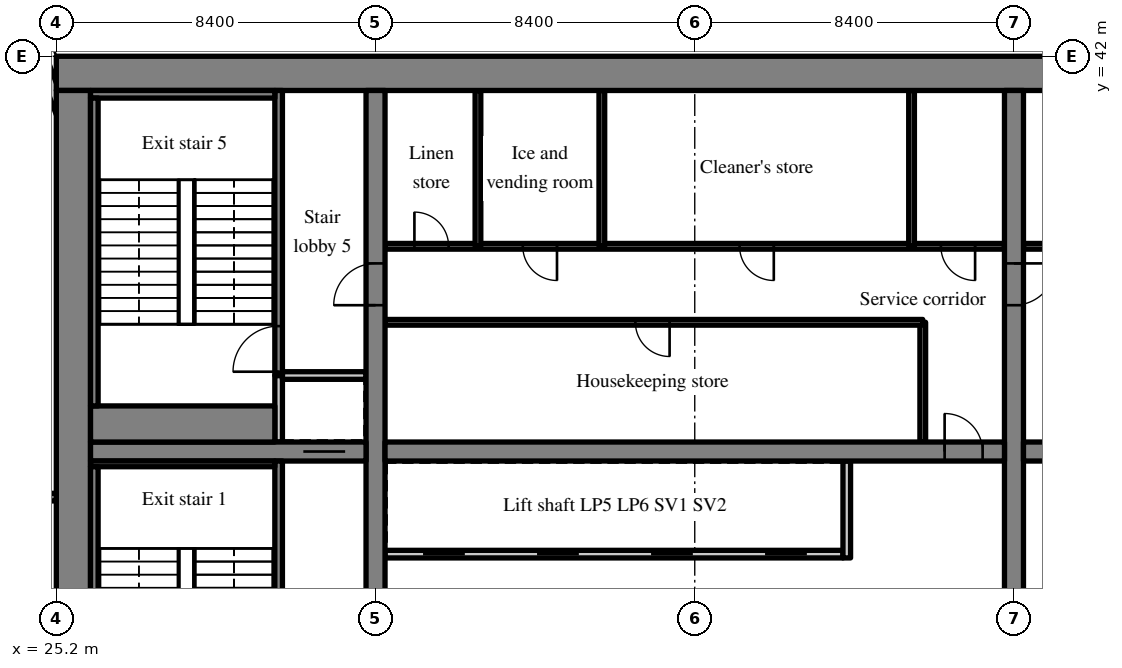
"""IFC4 building model, lengths in metres.
Left out: names, types, materials, properties, quantities, classifications, styles, units other than length and angle.
Written with IfcOpenShell. Run it as: python <this file> out.ifc"""

import sys

from ifc_helpers import new_model, si_unit, direction, frame, frame_2d, origin, place, context, subcontext, project, spatial, rectangle, extrude, source, transform, mapped, element, fill, save


model = new_model("IFC4")
c1 = context("Model", 3, precision=1e-05, world=origin(), true_north=direction((0.0, 1.0)))
c2 = subcontext(c1, "Body", "Model", "MODEL_VIEW")
j1 = project(units=[si_unit("LENGTHUNIT", "METRE"), si_unit("PLANEANGLEUNIT", "RADIAN")], contexts=[c1])
p1 = place(None, origin())
s1 = spatial("IfcSite", under=j1, at=p1, CompositionType="ELEMENT")
p2 = place(p1, origin())
s2 = spatial("IfcBuilding", under=s1, at=p2, CompositionType="ELEMENT")
p3 = place(p2, frame((0.0, 0.0, 121.8)))
s3 = spatial("IfcBuildingStorey", under=s2, at=p3, CompositionType="ELEMENT", Elevation=121.8)
m1 = source(origin(), c2, "Body", "SweptSolid", [
    extrude(rectangle(XDim=50.4, YDim=0.9, at=frame_2d((25.2, 0.0))), origin(), (0.0, 0.0, 1.0), 3.52),
])
p4 = place(p3, frame((25.2, 41.55, 0.0), z_axis=(0.0, 0.0, 1.0), x_axis=(1.0, 0.0, 0.0)))
e1 = element("IfcWall", 1, at=p4, inside=s3, PredefinedType="SHEAR", context=c2, shape_type="MappedRepresentation", body=[
    mapped(m1, transform((0.0, 0.0, 0.0), scale=1.0)),
])
m2 = source(origin(), c2, "Body", "SweptSolid", [
    extrude(rectangle(XDim=18.2, YDim=0.9, at=frame_2d((9.1, 0.0))), origin(), (0.0, 0.0, 1.0), 3.52),
])
p5 = place(p3, frame((25.65, 22.9, 0.0), z_axis=(0.0, 0.0, 1.0), x_axis=(0.0, 1.0, 0.0)))
e2 = element("IfcWall", 2, at=p5, inside=s3, PredefinedType="SHEAR", context=c2, shape_type="MappedRepresentation", body=[
    mapped(m2, transform((0.0, 0.0, 0.0), scale=1.0)),
])
m3 = source(origin(), c2, "Body", "SweptSolid", [
    extrude(rectangle(XDim=18.2, YDim=0.5, at=frame_2d((9.1, 0.0))), origin(), (0.0, 0.0, 1.0), 3.52),
])
p6 = place(p3, frame((33.6, 22.9, 0.0), z_axis=(0.0, 0.0, 1.0), x_axis=(0.0, 1.0, 0.0)))
e3 = element("IfcWall", 3, at=p6, inside=s3, PredefinedType="SHEAR", context=c2, shape_type="MappedRepresentation", body=[
    mapped(m3, transform((0.0, 0.0, 0.0), scale=1.0)),
])
m4 = source(origin(), c2, "Body", "SweptSolid", [
    extrude(rectangle(XDim=1.1, YDim=2.1, at=frame_2d((0.55, 1.05))), frame((0.0, 0.26, 0.0), z_axis=(0.0, -1.0, 0.0), x_axis=(1.0, 0.0, 0.0)), (0.0, 0.0, 1.0), 0.52),
])
p7 = place(p6, frame((12.55, 0.0, 0.0)))
e4 = element("IfcOpeningElement", 4, at=p7, cuts=e3, PredefinedType="OPENING", context=c2, shape_type="MappedRepresentation", body=[
    mapped(m4, transform((0.0, 0.0, 0.0), scale=1.0)),
])
p8 = place(p3, frame((50.4, 22.9, 0.0), z_axis=(0.0, 0.0, 1.0), x_axis=(0.0, 1.0, 0.0)))
e5 = element("IfcWall", 5, at=p8, inside=s3, PredefinedType="SHEAR", context=c2, shape_type="MappedRepresentation", body=[
    mapped(m3, transform((0.0, 0.0, 0.0), scale=1.0)),
])
p9 = place(p8, frame((12.55, 0.0, 0.0)))
e6 = element("IfcOpeningElement", 6, at=p9, cuts=e5, PredefinedType="OPENING", context=c2, shape_type="MappedRepresentation", body=[
    mapped(m4, transform((0.0, 0.0, 0.0), scale=1.0)),
])
m5 = source(origin(), c2, "Body", "SweptSolid", [
    extrude(rectangle(XDim=7.25, YDim=0.5, at=frame_2d((3.625, 0.0))), origin(), (0.0, 0.0, 1.0), 3.52),
])
p10 = place(p3, frame((26.1, 31.6, 0.0), z_axis=(0.0, 0.0, 1.0), x_axis=(1.0, 0.0, 0.0)))
e7 = element("IfcWall", 7, at=p10, inside=s3, PredefinedType="SHEAR", context=c2, shape_type="MappedRepresentation", body=[
    mapped(m5, transform((0.0, 0.0, 0.0), scale=1.0)),
])
p11 = place(p10, frame((5.6, 0.0, 0.0)))
e8 = element("IfcOpeningElement", 8, at=p11, cuts=e7, PredefinedType="OPENING", context=c2, shape_type="MappedRepresentation", body=[
    mapped(m4, transform((0.0, 0.0, 0.0), scale=1.0)),
])
m6 = source(origin(), c2, "Body", "SweptSolid", [
    extrude(rectangle(XDim=16.3, YDim=0.5, at=frame_2d((8.15, 0.0))), origin(), (0.0, 0.0, 1.0), 3.52),
])
p12 = place(p3, frame((33.85, 31.6, 0.0), z_axis=(0.0, 0.0, 1.0), x_axis=(1.0, 0.0, 0.0)))
e9 = element("IfcWall", 9, at=p12, inside=s3, PredefinedType="SHEAR", context=c2, shape_type="MappedRepresentation", body=[
    mapped(m6, transform((0.0, 0.0, 0.0), scale=1.0)),
])
m7 = source(origin(), c2, "Body", "SweptSolid", [
    extrude(rectangle(XDim=1.0, YDim=2.1, at=frame_2d((0.5, 1.05))), frame((0.0, 0.26, 0.0), z_axis=(0.0, -1.0, 0.0), x_axis=(1.0, 0.0, 0.0)), (0.0, 0.0, 1.0), 0.52),
])
p13 = place(p12, frame((14.725, 0.0, 0.0)))
e10 = element("IfcOpeningElement", 10, at=p13, cuts=e9, PredefinedType="OPENING", context=c2, shape_type="MappedRepresentation", body=[
    mapped(m7, transform((0.0, 0.0, 0.0), scale=1.0)),
])
m8 = source(origin(), c2, "Body", "SweptSolid", [
    extrude(rectangle(XDim=16.3, YDim=0.5, at=frame_2d((8.15, 0.0))), origin(), (0.0, 0.0, 1.0), 3.52),
])
p14 = place(p3, frame((50.65, 31.6, 0.0), z_axis=(0.0, 0.0, 1.0), x_axis=(1.0, 0.0, 0.0)))
e11 = element("IfcWall", 11, at=p14, inside=s3, PredefinedType="SHEAR", context=c2, shape_type="MappedRepresentation", body=[
    mapped(m8, transform((0.0, 0.0, 0.0), scale=1.0)),
])
p15 = place(p14, frame((0.575, 0.0, 0.0)))
e12 = element("IfcOpeningElement", 12, at=p15, cuts=e11, PredefinedType="OPENING", context=c2, shape_type="MappedRepresentation", body=[
    mapped(m7, transform((0.0, 0.0, 0.0), scale=1.0)),
])
m9 = source(origin(), c2, "Body", "SweptSolid", [
    extrude(rectangle(XDim=3.559, YDim=0.3, at=frame_2d((1.78, 0.0))), origin(), (0.0, 0.0, 1.0), 3.52),
])
p16 = place(p3, frame((25.55, 39.969, 0.0), z_axis=(0.0, 0.0, 1.0), x_axis=(-0.35779745313, 0.933799219604, 0.0)))
e13 = element("IfcWall", 13, at=p16, inside=s3, PredefinedType="SOLIDWALL", context=c2, shape_type="MappedRepresentation", body=[
    mapped(m9, transform((0.0, 0.0, 0.0), scale=1.0)),
])
m10 = source(origin(), c2, "Body", "SweptSolid", [
    extrude(rectangle(XDim=1.5, YDim=2.0, at=frame_2d((0.75, 1.0))), frame((0.0, 0.16, 0.0), z_axis=(0.0, -1.0, 0.0), x_axis=(1.0, 0.0, 0.0)), (0.0, 0.0, 1.0), 0.32),
])
p17 = place(p16, frame((1.903, 0.0, 0.9)))
e14 = element("IfcOpeningElement", 14, at=p17, cuts=e13, PredefinedType="OPENING", context=c2, shape_type="MappedRepresentation", body=[
    mapped(m10, transform((0.0, 0.0, 0.0), scale=1.0)),
])
m11 = source(origin(), c2, "Body", "SweptSolid", [
    extrude(rectangle(XDim=12.05, YDim=0.2, at=frame_2d((6.025, 0.0))), origin(), (0.0, 0.0, 1.0), 3.52),
])
p18 = place(p3, frame((33.85, 28.9, 0.0), z_axis=(0.0, 0.0, 1.0), x_axis=(1.0, 0.0, 0.0)))
e15 = element("IfcWall", 15, at=p18, inside=s3, PredefinedType="SOLIDWALL", context=c2, shape_type="MappedRepresentation", body=[
    mapped(m11, transform((0.0, 0.0, 0.0), scale=1.0)),
])
m12 = source(origin(), c2, "Body", "SweptSolid", [
    extrude(rectangle(XDim=1.1, YDim=2.1, at=frame_2d((0.55, 1.05))), frame((0.0, 0.11, 0.0), z_axis=(0.0, -1.0, 0.0), x_axis=(1.0, 0.0, 0.0)), (0.0, 0.0, 1.0), 0.22),
])
p19 = place(p18, frame((1.0, 0.0, 0.0)))
e16 = element("IfcOpeningElement", 16, at=p19, cuts=e15, PredefinedType="OPENING", context=c2, shape_type="MappedRepresentation", body=[
    mapped(m12, transform((0.0, 0.0, 0.0), scale=1.0)),
])
p20 = place(p18, frame((4.0, 0.0, 0.0)))
e17 = element("IfcOpeningElement", 17, at=p20, cuts=e15, PredefinedType="OPENING", context=c2, shape_type="MappedRepresentation", body=[
    mapped(m12, transform((0.0, 0.0, 0.0), scale=1.0)),
])
p21 = place(p18, frame((7.0, 0.0, 0.0)))
e18 = element("IfcOpeningElement", 18, at=p21, cuts=e15, PredefinedType="OPENING", context=c2, shape_type="MappedRepresentation", body=[
    mapped(m12, transform((0.0, 0.0, 0.0), scale=1.0)),
])
p22 = place(p18, frame((10.0, 0.0, 0.0)))
e19 = element("IfcOpeningElement", 19, at=p22, cuts=e15, PredefinedType="OPENING", context=c2, shape_type="MappedRepresentation", body=[
    mapped(m12, transform((0.0, 0.0, 0.0), scale=1.0)),
])
m13 = source(origin(), c2, "Body", "SweptSolid", [
    extrude(rectangle(XDim=2.55, YDim=0.2, at=frame_2d((1.275, 0.0))), origin(), (0.0, 0.0, 1.0), 3.52),
])
p23 = place(p3, frame((46.0, 28.8, 0.0), z_axis=(0.0, 0.0, 1.0), x_axis=(0.0, 1.0, 0.0)))
e20 = element("IfcWall", 20, at=p23, inside=s3, PredefinedType="SOLIDWALL", context=c2, shape_type="MappedRepresentation", body=[
    mapped(m13, transform((0.0, 0.0, 0.0), scale=1.0)),
])
m14 = source(origin(), c2, "Body", "SweptSolid", [
    extrude(rectangle(XDim=3.15, YDim=0.15, at=frame_2d((1.575, 0.0))), origin(), (0.0, 0.0, 1.0), 3.52),
])
p24 = place(p3, frame((48.0, 31.85, 0.0), z_axis=(0.0, 0.0, 1.0), x_axis=(0.0, 1.0, 0.0)))
e21 = element("IfcWall", 21, at=p24, inside=s3, PredefinedType="PARTITIONING", context=c2, shape_type="MappedRepresentation", body=[
    mapped(m14, transform((0.0, 0.0, 0.0), scale=1.0)),
])
m15 = source(origin(), c2, "Body", "SweptSolid", [
    extrude(rectangle(XDim=14.15, YDim=0.15, at=frame_2d((7.075, 0.0))), origin(), (0.0, 0.0, 1.0), 3.52),
])
p25 = place(p3, frame((33.85, 35.0, 0.0), z_axis=(0.0, 0.0, 1.0), x_axis=(1.0, 0.0, 0.0)))
e22 = element("IfcWall", 22, at=p25, inside=s3, PredefinedType="PARTITIONING", context=c2, shape_type="MappedRepresentation", body=[
    mapped(m15, transform((0.0, 0.0, 0.0), scale=1.0)),
])
m16 = source(origin(), c2, "Body", "SweptSolid", [
    extrude(rectangle(XDim=0.9, YDim=2.1, at=frame_2d((0.45, 1.05))), frame((0.0, 0.085, 0.0), z_axis=(0.0, -1.0, 0.0), x_axis=(1.0, 0.0, 0.0)), (0.0, 0.0, 1.0), 0.17),
])
p26 = place(p25, frame((6.588, 0.0, 0.0)))
e23 = element("IfcOpeningElement", 23, at=p26, cuts=e22, PredefinedType="OPENING", context=c2, shape_type="MappedRepresentation", body=[
    mapped(m16, transform((0.0, 0.0, 0.0), scale=1.0)),
])
m17 = source(origin(), c2, "Body", "SweptSolid", [
    extrude(rectangle(XDim=16.3, YDim=0.15, at=frame_2d((8.15, 0.0))), origin(), (0.0, 0.0, 1.0), 3.52),
])
p27 = place(p3, frame((33.85, 37.0, 0.0), z_axis=(0.0, 0.0, 1.0), x_axis=(1.0, 0.0, 0.0)))
e24 = element("IfcWall", 24, at=p27, inside=s3, PredefinedType="PARTITIONING", context=c2, shape_type="MappedRepresentation", body=[
    mapped(m17, transform((0.0, 0.0, 0.0), scale=1.0)),
])
p28 = place(p27, frame((0.773, 0.0, 0.0)))
e25 = element("IfcOpeningElement", 25, at=p28, cuts=e24, PredefinedType="OPENING", context=c2, shape_type="MappedRepresentation", body=[
    mapped(m16, transform((0.0, 0.0, 0.0), scale=1.0)),
])
p29 = place(p27, frame((3.625, 0.0, 0.0)))
e26 = element("IfcOpeningElement", 26, at=p29, cuts=e24, PredefinedType="OPENING", context=c2, shape_type="MappedRepresentation", body=[
    mapped(m16, transform((0.0, 0.0, 0.0), scale=1.0)),
])
p30 = place(p27, frame((9.33, 0.0, 0.0)))
e27 = element("IfcOpeningElement", 27, at=p30, cuts=e24, PredefinedType="OPENING", context=c2, shape_type="MappedRepresentation", body=[
    mapped(m16, transform((0.0, 0.0, 0.0), scale=1.0)),
])
p31 = place(p27, frame((14.627, 0.0, 0.0)))
e28 = element("IfcOpeningElement", 28, at=p31, cuts=e24, PredefinedType="OPENING", context=c2, shape_type="MappedRepresentation", body=[
    mapped(m16, transform((0.0, 0.0, 0.0), scale=1.0)),
])
m18 = source(origin(), c2, "Body", "SweptSolid", [
    extrude(rectangle(XDim=4.1, YDim=0.15, at=frame_2d((2.05, 0.0))), origin(), (0.0, 0.0, 1.0), 3.52),
])
for number, where, z_axis, x_axis in (
    (29, (36.295, 37.0, 0.0), (0.0, 0.0, 1.0), (0.0, 1.0, 0.0)),
    (30, (39.555, 37.0, 0.0), (0.0, 0.0, 1.0), (0.0, 1.0, 0.0)),
    (31, (47.705, 37.0, 0.0), (0.0, 0.0, 1.0), (0.0, 1.0, 0.0)),
):
    element("IfcWall", number, at=place(p3, frame(where, z_axis=z_axis, x_axis=x_axis)), inside=s3, PredefinedType="PARTITIONING", context=c2, shape_type="MappedRepresentation", body=[
        mapped(m18, transform((0.0, 0.0, 0.0), scale=1.0)),
    ])
m19 = source(origin(), c2, "Body", "SweptSolid", [
    extrude(rectangle(XDim=16.3, YDim=0.15, at=frame_2d((8.15, 0.0))), origin(), (0.0, 0.0, 1.0), 3.52),
])
p32 = place(p3, frame((66.95, 37.0, 0.0), z_axis=(0.0, 0.0, 1.0), x_axis=(-1.0, 0.0, 0.0)))
e32 = element("IfcWall", 32, at=p32, inside=s3, PredefinedType="PARTITIONING", context=c2, shape_type="MappedRepresentation", body=[
    mapped(m19, transform((0.0, 0.0, 0.0), scale=1.0)),
])
p33 = place(p32, frame((6.478, 0.0, 0.0)))
e33 = element("IfcOpeningElement", 33, at=p33, cuts=e32, PredefinedType="OPENING", context=c2, shape_type="MappedRepresentation", body=[
    mapped(m16, transform((0.0, 0.0, 0.0), scale=1.0)),
])
p34 = place(p32, frame((14.627, 0.0, 0.0)))
e34 = element("IfcOpeningElement", 34, at=p34, cuts=e32, PredefinedType="OPENING", context=c2, shape_type="MappedRepresentation", body=[
    mapped(m16, transform((0.0, 0.0, 0.0), scale=1.0)),
])
m20 = source(origin(), c2, "Body", "SweptSolid", [
    extrude(rectangle(XDim=8.45, YDim=0.2, at=frame_2d((4.225, 0.0))), origin(), (0.0, 0.0, 1.0), 3.52),
])
p35 = place(p3, frame((31.05, 22.9, 0.0), z_axis=(0.0, 0.0, 1.0), x_axis=(0.0, 1.0, 0.0)))
e35 = element("IfcWall", 35, at=p35, inside=s3, PredefinedType="SOLIDWALL", context=c2, shape_type="MappedRepresentation", body=[
    mapped(m20, transform((0.0, 0.0, 0.0), scale=1.0)),
])
m21 = source(origin(), c2, "Body", "SweptSolid", [
    extrude(rectangle(XDim=1.2, YDim=2.1, at=frame_2d((0.6, 1.05))), frame((0.0, 0.11, 0.0), z_axis=(0.0, -1.0, 0.0), x_axis=(1.0, 0.0, 0.0)), (0.0, 0.0, 1.0), 0.22),
])
p36 = place(p35, frame((0.7, 0.0, 0.0)))
e36 = element("IfcOpeningElement", 36, at=p36, cuts=e35, PredefinedType="OPENING", context=c2, shape_type="MappedRepresentation", body=[
    mapped(m21, transform((0.0, 0.0, 0.0), scale=1.0)),
])
m22 = source(origin(), c2, "Body", "SweptSolid", [
    extrude(rectangle(XDim=1.75, YDim=0.2, at=frame_2d((0.875, 0.0))), origin(), (0.0, 0.0, 1.0), 3.52),
])
p37 = place(p3, frame((31.05, 31.85, 0.0), z_axis=(0.0, 0.0, 1.0), x_axis=(0.0, 1.0, 0.0)))
e37 = element("IfcWall", 37, at=p37, inside=s3, PredefinedType="SOLIDWALL", context=c2, shape_type="MappedRepresentation", body=[
    mapped(m22, transform((0.0, 0.0, 0.0), scale=1.0)),
])
m23 = source(origin(), c2, "Body", "SweptSolid", [
    extrude(rectangle(XDim=2.2, YDim=0.2, at=frame_2d((1.1, 0.0))), origin(), (0.0, 0.0, 1.0), 3.52),
])
p38 = place(p3, frame((31.15, 33.6, 0.0), z_axis=(0.0, 0.0, 1.0), x_axis=(1.0, 0.0, 0.0)))
e38 = element("IfcWall", 38, at=p38, inside=s3, PredefinedType="SOLIDWALL", context=c2, shape_type="MappedRepresentation", body=[
    mapped(m23, transform((0.0, 0.0, 0.0), scale=1.0)),
])
m24 = source(origin(), c2, "Body", "SweptSolid", [
    extrude(rectangle(XDim=7.5, YDim=0.2, at=frame_2d((3.75, 0.0))), origin(), (0.0, 0.0, 1.0), 3.52),
])
p39 = place(p3, frame((31.05, 33.6, 0.0), z_axis=(0.0, 0.0, 1.0), x_axis=(0.0, 1.0, 0.0)))
e39 = element("IfcWall", 39, at=p39, inside=s3, PredefinedType="SOLIDWALL", context=c2, shape_type="MappedRepresentation", body=[
    mapped(m24, transform((0.0, 0.0, 0.0), scale=1.0)),
])
p40 = place(p39, frame((0.1, 0.0, 0.0)))
e40 = element("IfcOpeningElement", 40, at=p40, cuts=e39, PredefinedType="OPENING", context=c2, shape_type="MappedRepresentation", body=[
    mapped(m21, transform((0.0, 0.0, 0.0), scale=1.0)),
])
m25 = source(origin(), c2, "Body", "SweptSolid", [
    extrude(rectangle(XDim=8.225, YDim=0.2, at=frame_2d((4.112, 0.0))), origin(), (0.0, 0.0, 1.0), 3.52),
])
p41 = place(p3, frame((16.975, 30.4, 0.0), z_axis=(0.0, 0.0, 1.0), x_axis=(1.0, 0.0, 0.0)))
e41 = element("IfcWall", 41, at=p41, inside=s3, PredefinedType="SOLIDWALL", context=c2, shape_type="MappedRepresentation", body=[
    mapped(m25, transform((0.0, 0.0, 0.0), scale=1.0)),
])
m26 = source(origin(), c2, "Body", "SweptSolid", [
    extrude(rectangle(XDim=1.0, YDim=2.1, at=frame_2d((0.5, 1.05))), frame((0.0, 0.11, 0.0), z_axis=(0.0, -1.0, 0.0), x_axis=(1.0, 0.0, 0.0)), (0.0, 0.0, 1.0), 0.22),
])
p42 = place(p41, frame((6.125, 0.0, 0.0)))
e42 = element("IfcOpeningElement", 42, at=p42, cuts=e41, PredefinedType="OPENING", context=c2, shape_type="MappedRepresentation", body=[
    mapped(m26, transform((0.0, 0.0, 0.0), scale=1.0)),
])
m27 = source(origin(), c2, "Body", "SweptSolid", [
    extrude(rectangle(XDim=4.85, YDim=0.15, at=frame_2d((2.425, 0.0))), origin(), (0.0, 0.0, 1.0), 3.52),
])
p43 = place(p3, frame((26.1, 31.275, 0.0), z_axis=(0.0, 0.0, 1.0), x_axis=(1.0, 0.0, 0.0)))
e43 = element("IfcWall", 43, at=p43, inside=s3, PredefinedType="SOLIDWALL", context=c2, shape_type="MappedRepresentation", body=[
    mapped(m27, transform((0.0, 0.0, 0.0), scale=1.0)),
])
m28 = source(origin(), c2, "Body", "SweptSolid", [
    extrude(rectangle(XDim=8.1, YDim=0.2, at=frame_2d((4.05, 0.0))), origin(), (0.0, 0.0, 1.0), 3.52),
])
p44 = place(p3, frame((26.2, 23.1, 0.0), z_axis=(0.0, 0.0, 1.0), x_axis=(0.0, 1.0, 0.0)))
e44 = element("IfcWall", 44, at=p44, inside=s3, PredefinedType="SOLIDWALL", context=c2, shape_type="MappedRepresentation", body=[
    mapped(m28, transform((0.0, 0.0, 0.0), scale=1.0)),
])
m29 = source(origin(), c2, "Body", "SweptSolid", [
    extrude(rectangle(XDim=4.85, YDim=0.2, at=frame_2d((2.425, 0.0))), origin(), (0.0, 0.0, 1.0), 3.52),
])
p45 = place(p3, frame((26.1, 41.0, 0.0), z_axis=(0.0, 0.0, 1.0), x_axis=(1.0, 0.0, 0.0)))
e45 = element("IfcWall", 45, at=p45, inside=s3, PredefinedType="SOLIDWALL", context=c2, shape_type="MappedRepresentation", body=[
    mapped(m29, transform((0.0, 0.0, 0.0), scale=1.0)),
])
m30 = source(origin(), c2, "Body", "SweptSolid", [
    extrude(rectangle(XDim=4.85, YDim=0.95, at=frame_2d((2.425, 0.0))), origin(), (0.0, 0.0, 1.0), 3.52),
])
p46 = place(p3, frame((26.1, 32.325, 0.0), z_axis=(0.0, 0.0, 1.0), x_axis=(1.0, 0.0, 0.0)))
e46 = element("IfcWall", 46, at=p46, inside=s3, PredefinedType="SOLIDWALL", context=c2, shape_type="MappedRepresentation", body=[
    mapped(m30, transform((0.0, 0.0, 0.0), scale=1.0)),
])
p47 = place(p3, frame((26.2, 32.8, 0.0), z_axis=(0.0, 0.0, 1.0), x_axis=(0.0, 1.0, 0.0)))
e47 = element("IfcWall", 47, at=p47, inside=s3, PredefinedType="SOLIDWALL", context=c2, shape_type="MappedRepresentation", body=[
    mapped(m28, transform((0.0, 0.0, 0.0), scale=1.0)),
])
m31 = source(origin(), c2, "Body", "SweptSolid", [
    extrude(rectangle(XDim=1.0, YDim=2.1, at=frame_2d((0.5, 1.05))), frame((0.0, 0.025, 0.0), z_axis=(0.0, -1.0, 0.0), x_axis=(1.0, 0.0, 0.0)), (0.0, 0.0, 1.0), 0.05),
])
p48 = place(p13, origin())
e48 = element("IfcDoor", 48, at=p48, inside=s3, OperationType="SINGLE_SWING_LEFT", PredefinedType="DOOR", context=c2, shape_type="MappedRepresentation", body=[
    mapped(m31, transform((0.0, 0.0, 0.0), scale=1.0)),
])
fill(e10, e48)
m32 = source(origin(), c2, "Body", "SweptSolid", [
    extrude(rectangle(XDim=1.1, YDim=2.1, at=frame_2d((0.55, 1.05))), frame((0.0, 0.025, 0.0), z_axis=(0.0, -1.0, 0.0), x_axis=(1.0, 0.0, 0.0)), (0.0, 0.0, 1.0), 0.05),
])
p49 = place(p19, origin())
e49 = element("IfcDoor", 49, at=p49, inside=s3, OperationType="SLIDING_TO_LEFT", PredefinedType="DOOR", context=c2, shape_type="MappedRepresentation", body=[
    mapped(m32, transform((0.0, 0.0, 0.0), scale=1.0)),
])
fill(e16, e49)
p50 = place(p20, origin())
e50 = element("IfcDoor", 50, at=p50, inside=s3, OperationType="SLIDING_TO_RIGHT", PredefinedType="DOOR", context=c2, shape_type="MappedRepresentation", body=[
    mapped(m32, transform((0.0, 0.0, 0.0), scale=1.0)),
])
fill(e17, e50)
p51 = place(p21, origin())
e51 = element("IfcDoor", 51, at=p51, inside=s3, OperationType="SLIDING_TO_LEFT", PredefinedType="DOOR", context=c2, shape_type="MappedRepresentation", body=[
    mapped(m32, transform((0.0, 0.0, 0.0), scale=1.0)),
])
fill(e18, e51)
p52 = place(p22, origin())
e52 = element("IfcDoor", 52, at=p52, inside=s3, OperationType="SLIDING_TO_RIGHT", PredefinedType="DOOR", context=c2, shape_type="MappedRepresentation", body=[
    mapped(m32, transform((0.0, 0.0, 0.0), scale=1.0)),
])
fill(e19, e52)
m33 = source(origin(), c2, "Body", "SweptSolid", [
    extrude(rectangle(XDim=0.9, YDim=2.1, at=frame_2d((0.45, 1.05))), frame((0.0, 0.025, 0.0), z_axis=(0.0, -1.0, 0.0), x_axis=(1.0, 0.0, 0.0)), (0.0, 0.0, 1.0), 0.05),
])
p53 = place(p26, origin())
e53 = element("IfcDoor", 53, at=p53, inside=s3, OperationType="SINGLE_SWING_RIGHT", PredefinedType="DOOR", context=c2, shape_type="MappedRepresentation", body=[
    mapped(m33, transform((0.0, 0.0, 0.0), scale=1.0)),
])
fill(e23, e53)
p54 = place(p28, origin())
e54 = element("IfcDoor", 54, at=p54, inside=s3, OperationType="SINGLE_SWING_LEFT", PredefinedType="DOOR", context=c2, shape_type="MappedRepresentation", body=[
    mapped(m33, transform((0.0, 0.0, 0.0), scale=1.0)),
])
fill(e25, e54)
p55 = place(p29, origin())
e55 = element("IfcDoor", 55, at=p55, inside=s3, OperationType="SINGLE_SWING_RIGHT", PredefinedType="DOOR", context=c2, shape_type="MappedRepresentation", body=[
    mapped(m33, transform((0.0, 0.0, 0.0), scale=1.0)),
])
fill(e26, e55)
p56 = place(p30, origin())
e56 = element("IfcDoor", 56, at=p56, inside=s3, OperationType="SINGLE_SWING_RIGHT", PredefinedType="DOOR", context=c2, shape_type="MappedRepresentation", body=[
    mapped(m33, transform((0.0, 0.0, 0.0), scale=1.0)),
])
fill(e27, e56)
p57 = place(p31, origin())
e57 = element("IfcDoor", 57, at=p57, inside=s3, OperationType="SINGLE_SWING_RIGHT", PredefinedType="DOOR", context=c2, shape_type="MappedRepresentation", body=[
    mapped(m33, transform((0.0, 0.0, 0.0), scale=1.0)),
])
fill(e28, e57)
p58 = place(p11, origin())
e58 = element("IfcDoor", 58, at=p58, inside=s3, OperationType="SLIDING_TO_LEFT", PredefinedType="DOOR", context=c2, shape_type="MappedRepresentation", body=[
    mapped(m32, transform((0.0, 0.0, 0.0), scale=1.0)),
])
fill(e8, e58)
m34 = source(origin(), c2, "Body", "SweptSolid", [
    extrude(rectangle(XDim=1.2, YDim=2.1, at=frame_2d((0.6, 1.05))), frame((0.0, 0.025, 0.0), z_axis=(0.0, -1.0, 0.0), x_axis=(1.0, 0.0, 0.0)), (0.0, 0.0, 1.0), 0.05),
])
p59 = place(p40, origin())
e59 = element("IfcDoor", 59, at=p59, inside=s3, OperationType="SINGLE_SWING_LEFT", PredefinedType="DOOR", context=c2, shape_type="MappedRepresentation", body=[
    mapped(m34, transform((0.0, 0.0, 0.0), scale=1.0)),
])
fill(e40, e59)
p60 = place(p7, origin())
e60 = element("IfcDoor", 60, at=p60, inside=s3, OperationType="SINGLE_SWING_LEFT", PredefinedType="DOOR", context=c2, shape_type="MappedRepresentation", body=[
    mapped(m32, transform((0.0, 0.0, 0.0), scale=1.0)),
])
fill(e4, e60)
p61 = place(p9, origin())
e61 = element("IfcDoor", 61, at=p61, inside=s3, OperationType="SINGLE_SWING_RIGHT", PredefinedType="DOOR", context=c2, shape_type="MappedRepresentation", body=[
    mapped(m32, transform((0.0, 0.0, 0.0), scale=1.0)),
])
fill(e6, e61)
save(model, sys.argv[1])
